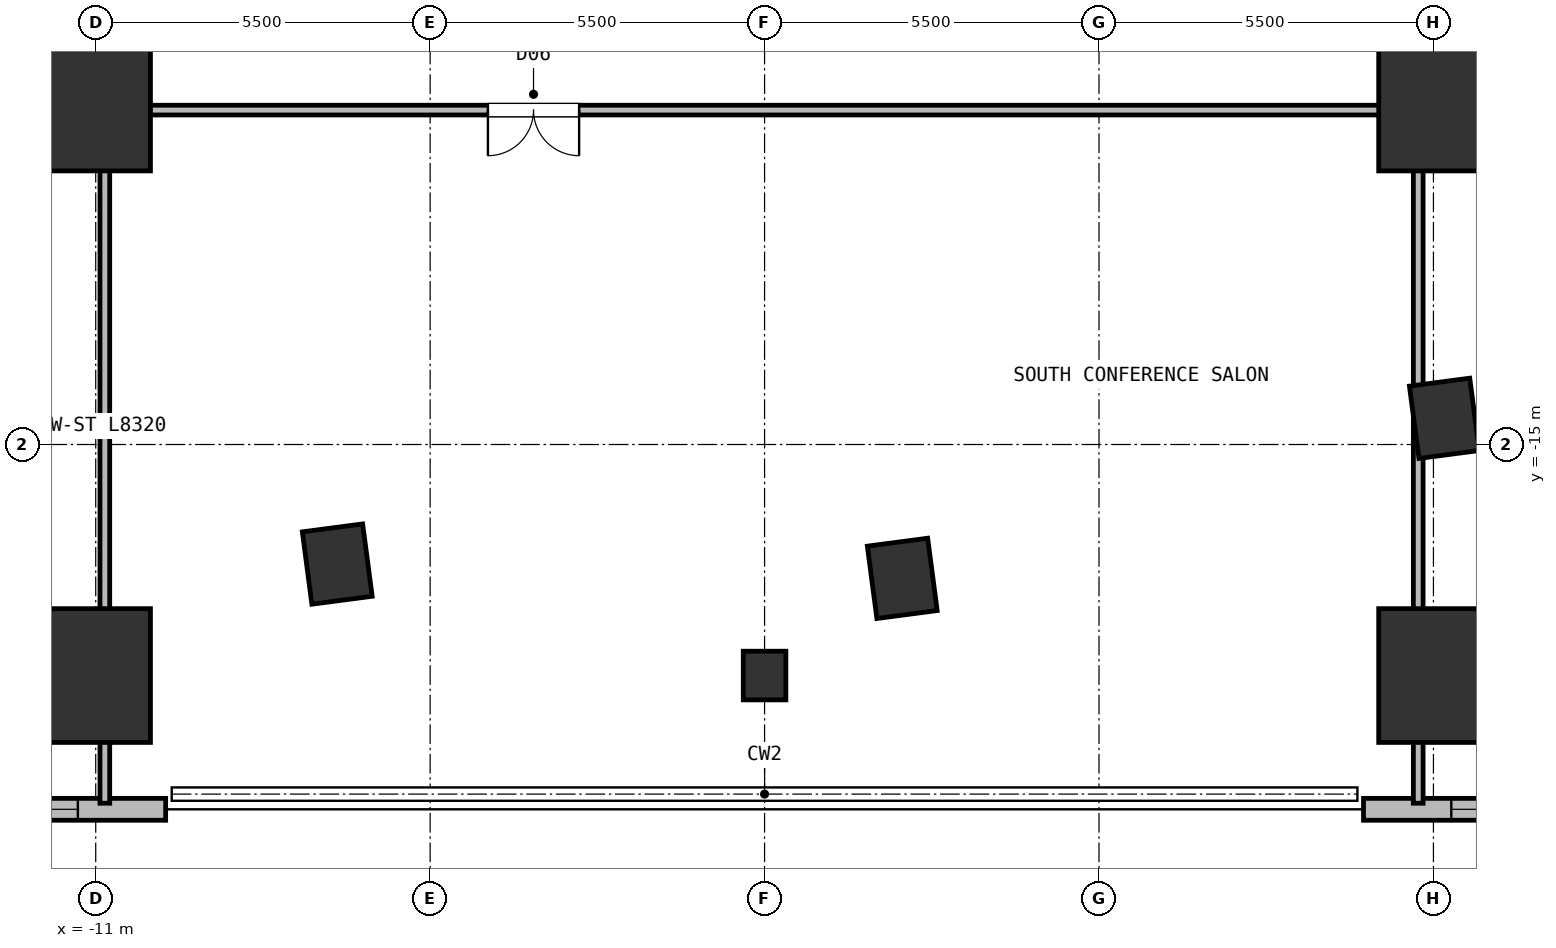
"""IFC4 building model, lengths in metres.
Left out: names, types, materials, properties, quantities, classifications, styles, units other than length and angle.
Written with IfcOpenShell. Run it as: python <this file> out.ifc"""

import sys

from ifc_helpers import new_model, si_unit, direction, frame, frame_2d, origin, origin_2d, place, context, subcontext, project, spatial, rectangle, extrude, element, fill, save


model = new_model("IFC4")
c1 = context("Model", 3, precision=1e-05, world=origin(), true_north=direction((0.0, 1.0)))
c2 = subcontext(c1, "Body", "Model", "MODEL_VIEW")
j1 = project(units=[si_unit("LENGTHUNIT", "METRE"), si_unit("PLANEANGLEUNIT", "RADIAN")], contexts=[c1])
p1 = place(None, origin())
s1 = spatial("IfcSite", under=j1, at=p1, CompositionType="ELEMENT")
p2 = place(p1, origin())
s2 = spatial("IfcBuilding", under=s1, at=p2, CompositionType="ELEMENT")
p3 = place(p2, frame((0.0, 0.0, 26.0)))
s3 = spatial("IfcBuildingStorey", under=s2, at=p3, CompositionType="ELEMENT", Elevation=26.0)
for number, where, z_axis, x_axis in (
    (1, (-7.028, -16.966, 0.0), (0.0, 0.0, 1.0), (0.991, 0.131, 0.0)),
    (2, (2.265, -17.202, 0.0), (0.0, 0.0, 1.0), (0.991, 0.131, 0.0)),
    (3, (11.179, -14.569, 0.0), (0.0, 0.0, 1.0), (0.991, 0.131, 0.0)),
):
    element("IfcColumn", number, at=place(p3, frame(where, z_axis=z_axis, x_axis=x_axis)), inside=s3, PredefinedType="COLUMN", context=c2, shape_type="SweptSolid", body=[
        extrude(rectangle(XDim=1.0, YDim=1.2, at=origin_2d()), origin(), (0.0, 0.0, 1.0), 4.5),
    ])
for number, where, z_axis, x_axis in (
    (4, (-11.0, -18.8, 0.0), (0.0, 0.0, 1.0), (1.0, 0.0, 0.0)),
    (5, (-11.0, -9.4, 0.0), (0.0, 0.0, 1.0), (1.0, 0.0, 0.0)),
    (6, (11.0, -18.8, 0.0), (0.0, 0.0, 1.0), (1.0, 0.0, 0.0)),
    (7, (11.0, -9.4, 0.0), (0.0, 0.0, 1.0), (1.0, 0.0, 0.0)),
):
    element("IfcColumn", number, at=place(p3, frame(where, z_axis=z_axis, x_axis=x_axis)), inside=s3, PredefinedType="COLUMN", context=c2, shape_type="SweptSolid", body=[
        extrude(rectangle(XDim=1.8, YDim=2.2, at=origin_2d()), origin(), (0.0, 0.0, 1.0), 4.5),
    ])
p4 = place(p3, frame((0.0, -18.8, 0.0), z_axis=(0.0, 0.0, 1.0), x_axis=(1.0, 0.0, 0.0)))
e8 = element("IfcColumn", 8, at=p4, inside=s3, PredefinedType="COLUMN", context=c2, shape_type="SweptSolid", body=[
    extrude(rectangle(XDim=0.7, YDim=0.8, at=origin_2d()), origin(), (0.0, 0.0, 1.0), 4.5),
])
p5 = place(p3, frame((-9.85, -21.0, 0.0), z_axis=(0.0, 0.0, 1.0), x_axis=(-1.0, 0.0, 0.0)))
e9 = element("IfcWall", 9, at=p5, inside=s3, PredefinedType="SOLIDWALL", context=c2, shape_type="SweptSolid", body=[
    extrude(rectangle(XDim=21.15, YDim=0.36, at=frame_2d((10.575, 0.0))), origin(), (0.0, 0.0, 1.0), 4.25),
])
p6 = place(p5, frame((1.444, 0.0, 0.95)))
e10 = element("IfcOpeningElement", 10, at=p6, cuts=e9, PredefinedType="OPENING", context=c2, shape_type="SweptSolid", body=[
    extrude(rectangle(XDim=2.4, YDim=2.6, at=frame_2d((1.2, 1.3))), frame((0.0, 0.19, 0.0), z_axis=(0.0, -1.0, 0.0), x_axis=(1.0, 0.0, 0.0)), (0.0, 0.0, 1.0), 0.38),
])
p7 = place(p5, frame((6.731, 0.0, 0.95)))
e11 = element("IfcOpeningElement", 11, at=p7, cuts=e9, PredefinedType="OPENING", context=c2, shape_type="SweptSolid", body=[
    extrude(rectangle(XDim=2.4, YDim=2.6, at=frame_2d((1.2, 1.3))), frame((0.0, 0.19, 0.0), z_axis=(0.0, -1.0, 0.0), x_axis=(1.0, 0.0, 0.0)), (0.0, 0.0, 1.0), 0.38),
])
p8 = place(p5, frame((12.019, 0.0, 0.95)))
e12 = element("IfcOpeningElement", 12, at=p8, cuts=e9, PredefinedType="OPENING", context=c2, shape_type="SweptSolid", body=[
    extrude(rectangle(XDim=2.4, YDim=2.6, at=frame_2d((1.2, 1.3))), frame((0.0, 0.19, 0.0), z_axis=(0.0, -1.0, 0.0), x_axis=(1.0, 0.0, 0.0)), (0.0, 0.0, 1.0), 0.38),
])
p9 = place(p5, frame((17.306, 0.0, 0.95)))
e13 = element("IfcOpeningElement", 13, at=p9, cuts=e9, PredefinedType="OPENING", context=c2, shape_type="SweptSolid", body=[
    extrude(rectangle(XDim=2.4, YDim=2.6, at=frame_2d((1.2, 1.3))), frame((0.0, 0.19, 0.0), z_axis=(0.0, -1.0, 0.0), x_axis=(1.0, 0.0, 0.0)), (0.0, 0.0, 1.0), 0.38),
])
p10 = place(p3, frame((31.0, -21.0, 0.0), z_axis=(0.0, 0.0, 1.0), x_axis=(-1.0, 0.0, 0.0)))
e14 = element("IfcWall", 14, at=p10, inside=s3, PredefinedType="SOLIDWALL", context=c2, shape_type="SweptSolid", body=[
    extrude(rectangle(XDim=21.15, YDim=0.36, at=frame_2d((10.575, 0.0))), origin(), (0.0, 0.0, 1.0), 4.25),
])
p11 = place(p10, frame((1.444, 0.0, 0.95)))
e15 = element("IfcOpeningElement", 15, at=p11, cuts=e14, PredefinedType="OPENING", context=c2, shape_type="SweptSolid", body=[
    extrude(rectangle(XDim=2.4, YDim=2.6, at=frame_2d((1.2, 1.3))), frame((0.0, 0.19, 0.0), z_axis=(0.0, -1.0, 0.0), x_axis=(1.0, 0.0, 0.0)), (0.0, 0.0, 1.0), 0.38),
])
p12 = place(p10, frame((6.731, 0.0, 0.95)))
e16 = element("IfcOpeningElement", 16, at=p12, cuts=e14, PredefinedType="OPENING", context=c2, shape_type="SweptSolid", body=[
    extrude(rectangle(XDim=2.4, YDim=2.6, at=frame_2d((1.2, 1.3))), frame((0.0, 0.19, 0.0), z_axis=(0.0, -1.0, 0.0), x_axis=(1.0, 0.0, 0.0)), (0.0, 0.0, 1.0), 0.38),
])
p13 = place(p10, frame((12.019, 0.0, 0.95)))
e17 = element("IfcOpeningElement", 17, at=p13, cuts=e14, PredefinedType="OPENING", context=c2, shape_type="SweptSolid", body=[
    extrude(rectangle(XDim=2.4, YDim=2.6, at=frame_2d((1.2, 1.3))), frame((0.0, 0.19, 0.0), z_axis=(0.0, -1.0, 0.0), x_axis=(1.0, 0.0, 0.0)), (0.0, 0.0, 1.0), 0.38),
])
p14 = place(p10, frame((17.306, 0.0, 0.95)))
e18 = element("IfcOpeningElement", 18, at=p14, cuts=e14, PredefinedType="OPENING", context=c2, shape_type="SweptSolid", body=[
    extrude(rectangle(XDim=2.4, YDim=2.6, at=frame_2d((1.2, 1.3))), frame((0.0, 0.19, 0.0), z_axis=(0.0, -1.0, 0.0), x_axis=(1.0, 0.0, 0.0)), (0.0, 0.0, 1.0), 0.38),
])
p15 = place(p3, frame((-10.85, -20.9, 0.0), z_axis=(0.0, 0.0, 1.0), x_axis=(0.0, 1.0, 0.0)))
e19 = element("IfcWall", 19, at=p15, inside=s3, PredefinedType="PARTITIONING", context=c2, shape_type="SweptSolid", body=[
    extrude(rectangle(XDim=24.6, YDim=0.16, at=frame_2d((12.3, 0.0))), origin(), (0.0, 0.0, 1.0), 3.62),
])
p16 = place(p15, frame((17.35, 0.0, 0.0)))
e20 = element("IfcOpeningElement", 20, at=p16, cuts=e19, PredefinedType="OPENING", context=c2, shape_type="SweptSolid", body=[
    extrude(rectangle(XDim=1.5, YDim=2.2, at=frame_2d((0.75, 1.1))), frame((0.0, 0.09, 0.0), z_axis=(0.0, -1.0, 0.0), x_axis=(1.0, 0.0, 0.0)), (0.0, 0.0, 1.0), 0.18),
])
p17 = place(p3, frame((10.75, -9.5, 0.0), z_axis=(0.0, 0.0, 1.0), x_axis=(-1.0, 0.0, 0.0)))
e21 = element("IfcWall", 21, at=p17, inside=s3, PredefinedType="PARTITIONING", context=c2, shape_type="SweptSolid", body=[
    extrude(rectangle(XDim=21.5, YDim=0.16, at=frame_2d((10.75, 0.0))), origin(), (0.0, 0.0, 1.0), 3.33),
])
p18 = place(p17, frame((13.8, 0.0, 0.0)))
e22 = element("IfcOpeningElement", 22, at=p18, cuts=e21, PredefinedType="OPENING", context=c2, shape_type="SweptSolid", body=[
    extrude(rectangle(XDim=1.5, YDim=2.2, at=frame_2d((0.75, 1.1))), frame((0.0, 0.09, 0.0), z_axis=(0.0, -1.0, 0.0), x_axis=(1.0, 0.0, 0.0)), (0.0, 0.0, 1.0), 0.18),
])
p19 = place(p3, frame((10.75, -20.9, 0.0), z_axis=(0.0, 0.0, 1.0), x_axis=(0.0, 1.0, 0.0)))
e23 = element("IfcWall", 23, at=p19, inside=s3, PredefinedType="PARTITIONING", context=c2, shape_type="SweptSolid", body=[
    extrude(rectangle(XDim=11.3, YDim=0.16, at=frame_2d((5.65, 0.0))), origin(), (0.0, 0.0, 1.0), 4.25),
])
p20 = place(p6, origin())
e24 = element("IfcWindow", 24, at=p20, inside=s3, PartitioningType="SINGLE_PANEL", PredefinedType="WINDOW", context=c2, shape_type="SweptSolid", body=[
    extrude(rectangle(XDim=2.4, YDim=2.6, at=frame_2d((1.2, 1.3))), frame((0.0, 0.03, 0.0), z_axis=(0.0, -1.0, 0.0), x_axis=(1.0, 0.0, 0.0)), (0.0, 0.0, 1.0), 0.06),
])
fill(e10, e24)
p21 = place(p14, origin())
e25 = element("IfcWindow", 25, at=p21, inside=s3, PartitioningType="SINGLE_PANEL", PredefinedType="WINDOW", context=c2, shape_type="SweptSolid", body=[
    extrude(rectangle(XDim=2.4, YDim=2.6, at=frame_2d((1.2, 1.3))), frame((0.0, 0.03, 0.0), z_axis=(0.0, -1.0, 0.0), x_axis=(1.0, 0.0, 0.0)), (0.0, 0.0, 1.0), 0.06),
])
fill(e18, e25)
p22 = place(p18, origin())
e26 = element("IfcDoor", 26, at=p22, inside=s3, OperationType="DOUBLE_DOOR_SINGLE_SWING", PredefinedType="DOOR", context=c2, shape_type="SweptSolid", body=[
    extrude(rectangle(XDim=1.5, YDim=2.2, at=frame_2d((0.75, 1.1))), frame((0.0, 0.025, 0.0), z_axis=(0.0, -1.0, 0.0), x_axis=(1.0, 0.0, 0.0)), (0.0, 0.0, 1.0), 0.05),
])
fill(e22, e26)
save(model, sys.argv[1])
